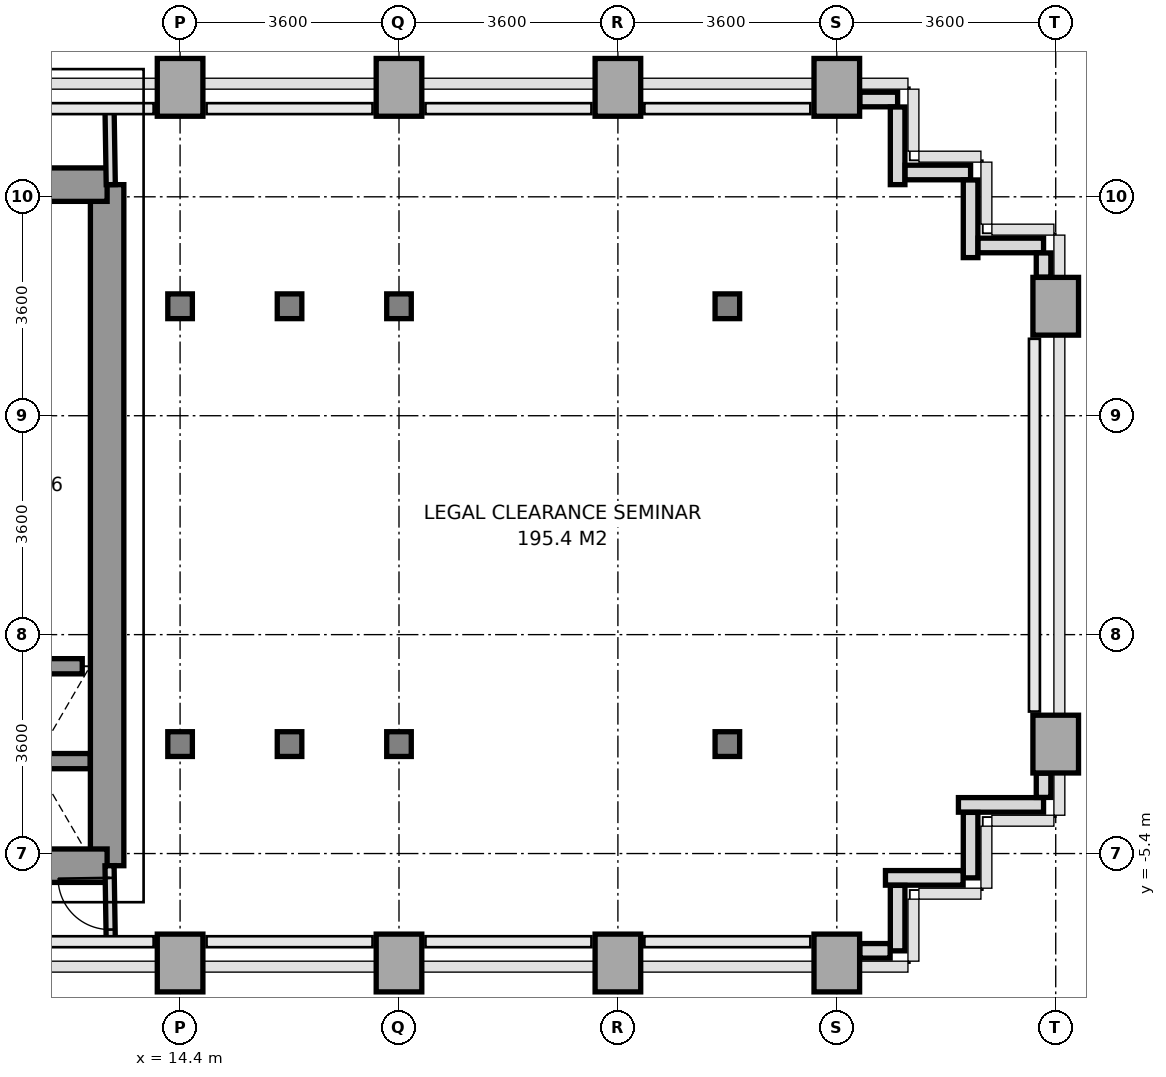
"""IFC4 building model, lengths in metres.
Left out: names, types, materials, properties, quantities, classifications, styles, units other than length and angle.
Written with IfcOpenShell. Run it as: python <this file> out.ifc"""

import sys

from ifc_helpers import new_model, si_unit, direction, frame, frame_2d, origin, origin_2d, place, context, subcontext, project, spatial, rectangle, i_section, extrude, source, transform, mapped, element, fill, save


model = new_model("IFC4")
c1 = context("Model", 3, precision=1e-05, world=origin(), true_north=direction((0.0, 1.0)))
c2 = subcontext(c1, "Body", "Model", "MODEL_VIEW")
j1 = project(units=[si_unit("LENGTHUNIT", "METRE"), si_unit("PLANEANGLEUNIT", "RADIAN")], contexts=[c1])
p1 = place(None, origin())
s1 = spatial("IfcSite", under=j1, at=p1, CompositionType="ELEMENT")
p2 = place(p1, origin())
s2 = spatial("IfcBuilding", under=s1, at=p2, CompositionType="ELEMENT")
p3 = place(p2, frame((0.0, 0.0, 61.2)))
s3 = spatial("IfcBuildingStorey", under=s2, at=p3, CompositionType="ELEMENT", Elevation=61.2)
m1 = source(origin(), c2, "Body", "SweptSolid", [
    extrude(rectangle(XDim=0.75, YDim=0.95, at=origin_2d()), origin(), (0.0, 0.0, 1.0), 3.2),
])
p4 = place(p3, frame((14.4, -7.2, 0.0), z_axis=(0.0, 0.0, 1.0), x_axis=(1.0, 0.0, 0.0)))
e1 = element("IfcColumn", 1, at=p4, inside=s3, PredefinedType="COLUMN", context=c2, shape_type="MappedRepresentation", body=[
    mapped(m1, transform((0.0, 0.0, 0.0), x_axis=(1.0, 0.0, 0.0), y_axis=(0.0, 1.0, 0.0), z_axis=(0.0, 0.0, 1.0), scale=1.0)),
])
m2 = source(origin(), c2, "Body", "SweptSolid", [
    extrude(i_section(OverallWidth=0.404, OverallDepth=0.407, WebThickness=0.022, FlangeThickness=0.035, at=origin_2d()), origin(), (0.0, 0.0, 1.0), 3.2),
])
for number, where, z_axis, x_axis in (
    (2, (14.4, -3.6, 0.0), (0.0, 0.0, 1.0), (1.0, 0.0, 0.0)),
    (3, (14.4, 3.6, 0.0), (0.0, 0.0, 1.0), (1.0, 0.0, 0.0)),
):
    element("IfcColumn", number, at=place(p3, frame(where, z_axis=z_axis, x_axis=x_axis)), inside=s3, PredefinedType="COLUMN", context=c2, shape_type="MappedRepresentation", body=[
        mapped(m2, transform((0.0, 0.0, 0.0), x_axis=(1.0, 0.0, 0.0), y_axis=(0.0, 1.0, 0.0), z_axis=(0.0, 0.0, 1.0), scale=1.0)),
    ])
p5 = place(p3, frame((14.4, 7.2, 0.0), z_axis=(0.0, 0.0, 1.0), x_axis=(1.0, 0.0, 0.0)))
e4 = element("IfcColumn", 4, at=p5, inside=s3, PredefinedType="COLUMN", context=c2, shape_type="MappedRepresentation", body=[
    mapped(m1, transform((0.0, 0.0, 0.0), x_axis=(1.0, 0.0, 0.0), y_axis=(0.0, 1.0, 0.0), z_axis=(0.0, 0.0, 1.0), scale=1.0)),
])
for number, where, z_axis, x_axis in (
    (5, (16.2, -3.6, 0.0), (0.0, 0.0, 1.0), (1.0, 0.0, 0.0)),
    (6, (16.2, 3.6, 0.0), (0.0, 0.0, 1.0), (1.0, 0.0, 0.0)),
):
    element("IfcColumn", number, at=place(p3, frame(where, z_axis=z_axis, x_axis=x_axis)), inside=s3, PredefinedType="COLUMN", context=c2, shape_type="MappedRepresentation", body=[
        mapped(m2, transform((0.0, 0.0, 0.0), x_axis=(1.0, 0.0, 0.0), y_axis=(0.0, 1.0, 0.0), z_axis=(0.0, 0.0, 1.0), scale=1.0)),
    ])
p6 = place(p3, frame((18.0, -7.2, 0.0), z_axis=(0.0, 0.0, 1.0), x_axis=(1.0, 0.0, 0.0)))
e7 = element("IfcColumn", 7, at=p6, inside=s3, PredefinedType="COLUMN", context=c2, shape_type="MappedRepresentation", body=[
    mapped(m1, transform((0.0, 0.0, 0.0), x_axis=(1.0, 0.0, 0.0), y_axis=(0.0, 1.0, 0.0), z_axis=(0.0, 0.0, 1.0), scale=1.0)),
])
for number, where, z_axis, x_axis in (
    (8, (18.0, -3.6, 0.0), (0.0, 0.0, 1.0), (1.0, 0.0, 0.0)),
    (9, (18.0, 3.6, 0.0), (0.0, 0.0, 1.0), (1.0, 0.0, 0.0)),
):
    element("IfcColumn", number, at=place(p3, frame(where, z_axis=z_axis, x_axis=x_axis)), inside=s3, PredefinedType="COLUMN", context=c2, shape_type="MappedRepresentation", body=[
        mapped(m2, transform((0.0, 0.0, 0.0), x_axis=(1.0, 0.0, 0.0), y_axis=(0.0, 1.0, 0.0), z_axis=(0.0, 0.0, 1.0), scale=1.0)),
    ])
for number, where, z_axis, x_axis in (
    (10, (18.0, 7.2, 0.0), (0.0, 0.0, 1.0), (1.0, 0.0, 0.0)),
    (11, (21.6, -7.2, 0.0), (0.0, 0.0, 1.0), (1.0, 0.0, 0.0)),
    (12, (21.6, 7.2, 0.0), (0.0, 0.0, 1.0), (1.0, 0.0, 0.0)),
):
    element("IfcColumn", number, at=place(p3, frame(where, z_axis=z_axis, x_axis=x_axis)), inside=s3, PredefinedType="COLUMN", context=c2, shape_type="MappedRepresentation", body=[
        mapped(m1, transform((0.0, 0.0, 0.0), x_axis=(1.0, 0.0, 0.0), y_axis=(0.0, 1.0, 0.0), z_axis=(0.0, 0.0, 1.0), scale=1.0)),
    ])
for number, where, z_axis, x_axis in (
    (13, (23.4, -3.6, 0.0), (0.0, 0.0, 1.0), (1.0, 0.0, 0.0)),
    (14, (23.4, 3.6, 0.0), (0.0, 0.0, 1.0), (1.0, 0.0, 0.0)),
):
    element("IfcColumn", number, at=place(p3, frame(where, z_axis=z_axis, x_axis=x_axis)), inside=s3, PredefinedType="COLUMN", context=c2, shape_type="MappedRepresentation", body=[
        mapped(m2, transform((0.0, 0.0, 0.0), x_axis=(1.0, 0.0, 0.0), y_axis=(0.0, 1.0, 0.0), z_axis=(0.0, 0.0, 1.0), scale=1.0)),
    ])
for number, where, z_axis, x_axis in (
    (15, (25.2, -7.2, 0.0), (0.0, 0.0, 1.0), (1.0, 0.0, 0.0)),
    (16, (25.2, 7.2, 0.0), (0.0, 0.0, 1.0), (1.0, 0.0, 0.0)),
    (17, (28.8, -3.6, 0.0), (0.0, 0.0, 1.0), (1.0, 0.0, 0.0)),
    (18, (28.8, 3.6, 0.0), (0.0, 0.0, 1.0), (1.0, 0.0, 0.0)),
):
    element("IfcColumn", number, at=place(p3, frame(where, z_axis=z_axis, x_axis=x_axis)), inside=s3, PredefinedType="COLUMN", context=c2, shape_type="MappedRepresentation", body=[
        mapped(m1, transform((0.0, 0.0, 0.0), x_axis=(1.0, 0.0, 0.0), y_axis=(0.0, 1.0, 0.0), z_axis=(0.0, 0.0, 1.0), scale=1.0)),
    ])
p7 = place(p3, frame((28.6, -4.6, 0.0), z_axis=(0.0, 0.0, 1.0), x_axis=(-1.0, 0.0, 0.0)))
e19 = element("IfcWall", 19, at=p7, inside=s3, PredefinedType="PARAPET", context=c2, shape_type="SweptSolid", body=[
    extrude(rectangle(XDim=1.4, YDim=0.24, at=frame_2d((0.7, 0.0))), origin(), (0.0, 0.0, 1.0), 1.15),
])
p8 = place(p3, frame((27.4, -4.723, 0.0), z_axis=(0.0, 0.0, 1.0), x_axis=(0.0, -1.0, 0.0)))
e20 = element("IfcWall", 20, at=p8, inside=s3, PredefinedType="PARAPET", context=c2, shape_type="SweptSolid", body=[
    extrude(rectangle(XDim=1.077, YDim=0.24, at=frame_2d((0.539, 0.0))), origin(), (0.0, 0.0, 1.0), 1.15),
])
p9 = place(p3, frame((27.277, -5.8, 0.0), z_axis=(0.0, 0.0, 1.0), x_axis=(-1.0, 0.0, 0.0)))
e21 = element("IfcWall", 21, at=p9, inside=s3, PredefinedType="PARAPET", context=c2, shape_type="SweptSolid", body=[
    extrude(rectangle(XDim=1.277, YDim=0.24, at=frame_2d((0.639, 0.0))), origin(), (0.0, 0.0, 1.0), 1.15),
])
p10 = place(p3, frame((26.2, -5.923, 0.0), z_axis=(0.0, 0.0, 1.0), x_axis=(0.0, -1.0, 0.0)))
e22 = element("IfcWall", 22, at=p10, inside=s3, PredefinedType="PARAPET", context=c2, shape_type="SweptSolid", body=[
    extrude(rectangle(XDim=1.077, YDim=0.24, at=frame_2d((0.539, 0.0))), origin(), (0.0, 0.0, 1.0), 1.15),
])
p11 = place(p3, frame((26.077, -7.0, 0.0), z_axis=(0.0, 0.0, 1.0), x_axis=(-1.0, 0.0, 0.0)))
e23 = element("IfcWall", 23, at=p11, inside=s3, PredefinedType="PARAPET", context=c2, shape_type="SweptSolid", body=[
    extrude(rectangle(XDim=0.499, YDim=0.24, at=frame_2d((0.25, 0.0))), origin(), (0.0, 0.0, 1.0), 1.15),
])
p12 = place(p3, frame((25.578, 7.0, 0.0), z_axis=(0.0, 0.0, 1.0), x_axis=(1.0, 0.0, 0.0)))
e24 = element("IfcWall", 24, at=p12, inside=s3, PredefinedType="PARAPET", context=c2, shape_type="SweptSolid", body=[
    extrude(rectangle(XDim=0.622, YDim=0.24, at=frame_2d((0.311, 0.0))), origin(), (0.0, 0.0, 1.0), 1.15),
])
p13 = place(p3, frame((26.2, 6.877, 0.0), z_axis=(0.0, 0.0, 1.0), x_axis=(0.0, -1.0, 0.0)))
e25 = element("IfcWall", 25, at=p13, inside=s3, PredefinedType="PARAPET", context=c2, shape_type="SweptSolid", body=[
    extrude(rectangle(XDim=1.277, YDim=0.24, at=frame_2d((0.638, 0.0))), origin(), (0.0, 0.0, 1.0), 1.15),
])
p14 = place(p3, frame((26.323, 5.8, 0.0), z_axis=(0.0, 0.0, 1.0), x_axis=(1.0, 0.0, 0.0)))
e26 = element("IfcWall", 26, at=p14, inside=s3, PredefinedType="PARAPET", context=c2, shape_type="SweptSolid", body=[
    extrude(rectangle(XDim=1.077, YDim=0.24, at=frame_2d((0.539, 0.0))), origin(), (0.0, 0.0, 1.0), 1.15),
])
p15 = place(p3, frame((27.4, 5.677, 0.0), z_axis=(0.0, 0.0, 1.0), x_axis=(0.0, -1.0, 0.0)))
e27 = element("IfcWall", 27, at=p15, inside=s3, PredefinedType="PARAPET", context=c2, shape_type="SweptSolid", body=[
    extrude(rectangle(XDim=1.277, YDim=0.24, at=frame_2d((0.639, 0.0))), origin(), (0.0, 0.0, 1.0), 1.15),
])
p16 = place(p3, frame((27.523, 4.6, 0.0), z_axis=(0.0, 0.0, 1.0), x_axis=(1.0, 0.0, 0.0)))
e28 = element("IfcWall", 28, at=p16, inside=s3, PredefinedType="PARAPET", context=c2, shape_type="SweptSolid", body=[
    extrude(rectangle(XDim=1.077, YDim=0.24, at=frame_2d((0.539, 0.0))), origin(), (0.0, 0.0, 1.0), 1.15),
])
for number, where, z_axis, x_axis in (
    (29, (28.6, 4.477, 0.0), (0.0, 0.0, 1.0), (0.0, -1.0, 0.0)),
    (30, (28.6, -4.078, 0.0), (0.0, 0.0, 1.0), (0.0, -1.0, 0.0)),
):
    element("IfcWall", number, at=place(p3, frame(where, z_axis=z_axis, x_axis=x_axis)), inside=s3, PredefinedType="PARAPET", context=c2, shape_type="SweptSolid", body=[
        extrude(rectangle(XDim=0.399, YDim=0.24, at=frame_2d((0.2, 0.0))), origin(), (0.0, 0.0, 1.0), 1.15),
    ])
p17 = place(p3, frame((13.2, -5.6, 0.0), z_axis=(0.0, 0.0, 1.0), x_axis=(0.0, 1.0, 0.0)))
e31 = element("IfcWall", 31, at=p17, inside=s3, PredefinedType="SHEAR", context=c2, shape_type="SweptSolid", body=[
    extrude(rectangle(XDim=11.2, YDim=0.55, at=frame_2d((5.6, 0.0))), origin(), (0.0, 0.0, 1.0), 3.2),
])
p18 = place(p3, frame((11.381, 5.6, 0.0), z_axis=(0.0, 0.0, 1.0), x_axis=(1.0, 0.0, 0.0)))
e32 = element("IfcWall", 32, at=p18, inside=s3, PredefinedType="SHEAR", context=c2, shape_type="SweptSolid", body=[
    extrude(rectangle(XDim=1.819, YDim=0.55, at=frame_2d((0.909, 0.0))), origin(), (0.0, 0.0, 1.0), 3.2),
])
p19 = place(p3, frame((5.4, -5.6, 0.0), z_axis=(0.0, 0.0, 1.0), x_axis=(1.0, 0.0, 0.0)))
e33 = element("IfcWall", 33, at=p19, inside=s3, PredefinedType="SHEAR", context=c2, shape_type="SweptSolid", body=[
    extrude(rectangle(XDim=7.8, YDim=0.55, at=frame_2d((3.9, 0.0))), origin(), (0.0, 0.0, 1.0), 3.2),
])
p20 = place(p19, frame((3.0, 0.0, 0.0)))
e34 = element("IfcOpeningElement", 34, at=p20, cuts=e33, PredefinedType="OPENING", context=c2, shape_type="SweptSolid", body=[
    extrude(rectangle(XDim=1.2, YDim=2.2, at=frame_2d((0.6, 1.1))), frame((0.0, 0.285, 0.0), z_axis=(0.0, -1.0, 0.0), x_axis=(1.0, 0.0, 0.0)), (0.0, 0.0, 1.0), 0.57),
])
p21 = place(p3, frame((11.08, -3.88, 0.0), z_axis=(0.0, 0.0, 1.0), x_axis=(1.0, 0.0, 0.0)))
e35 = element("IfcWall", 35, at=p21, inside=s3, PredefinedType="SOLIDWALL", context=c2, shape_type="SweptSolid", body=[
    extrude(rectangle(XDim=1.84, YDim=0.25, at=frame_2d((0.92, 0.0))), origin(), (0.0, 0.0, 1.0), 3.2),
])
p22 = place(p3, frame((11.209, -2.32, 0.0), z_axis=(0.0, 0.0, 1.0), x_axis=(1.0, 0.0, 0.0)))
e36 = element("IfcWall", 36, at=p22, inside=s3, PredefinedType="SOLIDWALL", context=c2, shape_type="SweptSolid", body=[
    extrude(rectangle(XDim=1.582, YDim=0.25, at=frame_2d((0.791, 0.0))), origin(), (0.0, 0.0, 1.0), 3.2),
])
p23 = place(p3, frame((13.26, 5.6, 0.0), z_axis=(0.0, 0.0, 1.0), x_axis=(-0.016013571389, 0.999871774545, 0.0)))
e37 = element("IfcWall", 37, at=p23, inside=s3, PredefinedType="PARTITIONING", context=c2, shape_type="SweptSolid", body=[
    extrude(rectangle(XDim=1.25, YDim=0.15, at=frame_2d((0.625, 0.0))), origin(), (0.0, 0.0, 1.0), 3.2),
])
p24 = place(p3, frame((13.26, -6.85, 0.0), z_axis=(0.0, 0.0, 1.0), x_axis=(-0.016013571389, 0.999871774545, 0.0)))
e38 = element("IfcWall", 38, at=p24, inside=s3, PredefinedType="PARTITIONING", context=c2, shape_type="SweptSolid", body=[
    extrude(rectangle(XDim=1.25, YDim=0.15, at=frame_2d((0.625, 0.0))), origin(), (0.0, 0.0, 1.0), 3.2),
])
p25 = place(p24, frame((0.2, 0.0, 0.0)))
e39 = element("IfcOpeningElement", 39, at=p25, cuts=e38, PredefinedType="OPENING", context=c2, shape_type="SweptSolid", body=[
    extrude(rectangle(XDim=0.85, YDim=2.1, at=frame_2d((0.425, 1.05))), frame((0.0, 0.085, 0.0), z_axis=(0.0, -1.0, 0.0), x_axis=(1.0, 0.0, 0.0)), (0.0, 0.0, 1.0), 0.17),
])
m3 = source(origin(), c2, "Body", "SweptSolid", [
    extrude(rectangle(XDim=0.85, YDim=2.1, at=frame_2d((0.425, 1.05))), frame((0.0, 0.025, 0.0), z_axis=(0.0, -1.0, 0.0), x_axis=(1.0, 0.0, 0.0)), (0.0, 0.0, 1.0), 0.05),
])
p26 = place(p25, origin())
e40 = element("IfcDoor", 40, at=p26, inside=s3, OperationType="SINGLE_SWING_RIGHT", PredefinedType="DOOR", context=c2, shape_type="MappedRepresentation", body=[
    mapped(m3, transform((0.0, 0.0, 0.0), x_axis=(1.0, 0.0, 0.0), y_axis=(0.0, 1.0, 0.0), z_axis=(0.0, 0.0, 1.0), scale=1.0)),
])
fill(e39, e40)
save(model, sys.argv[1])
